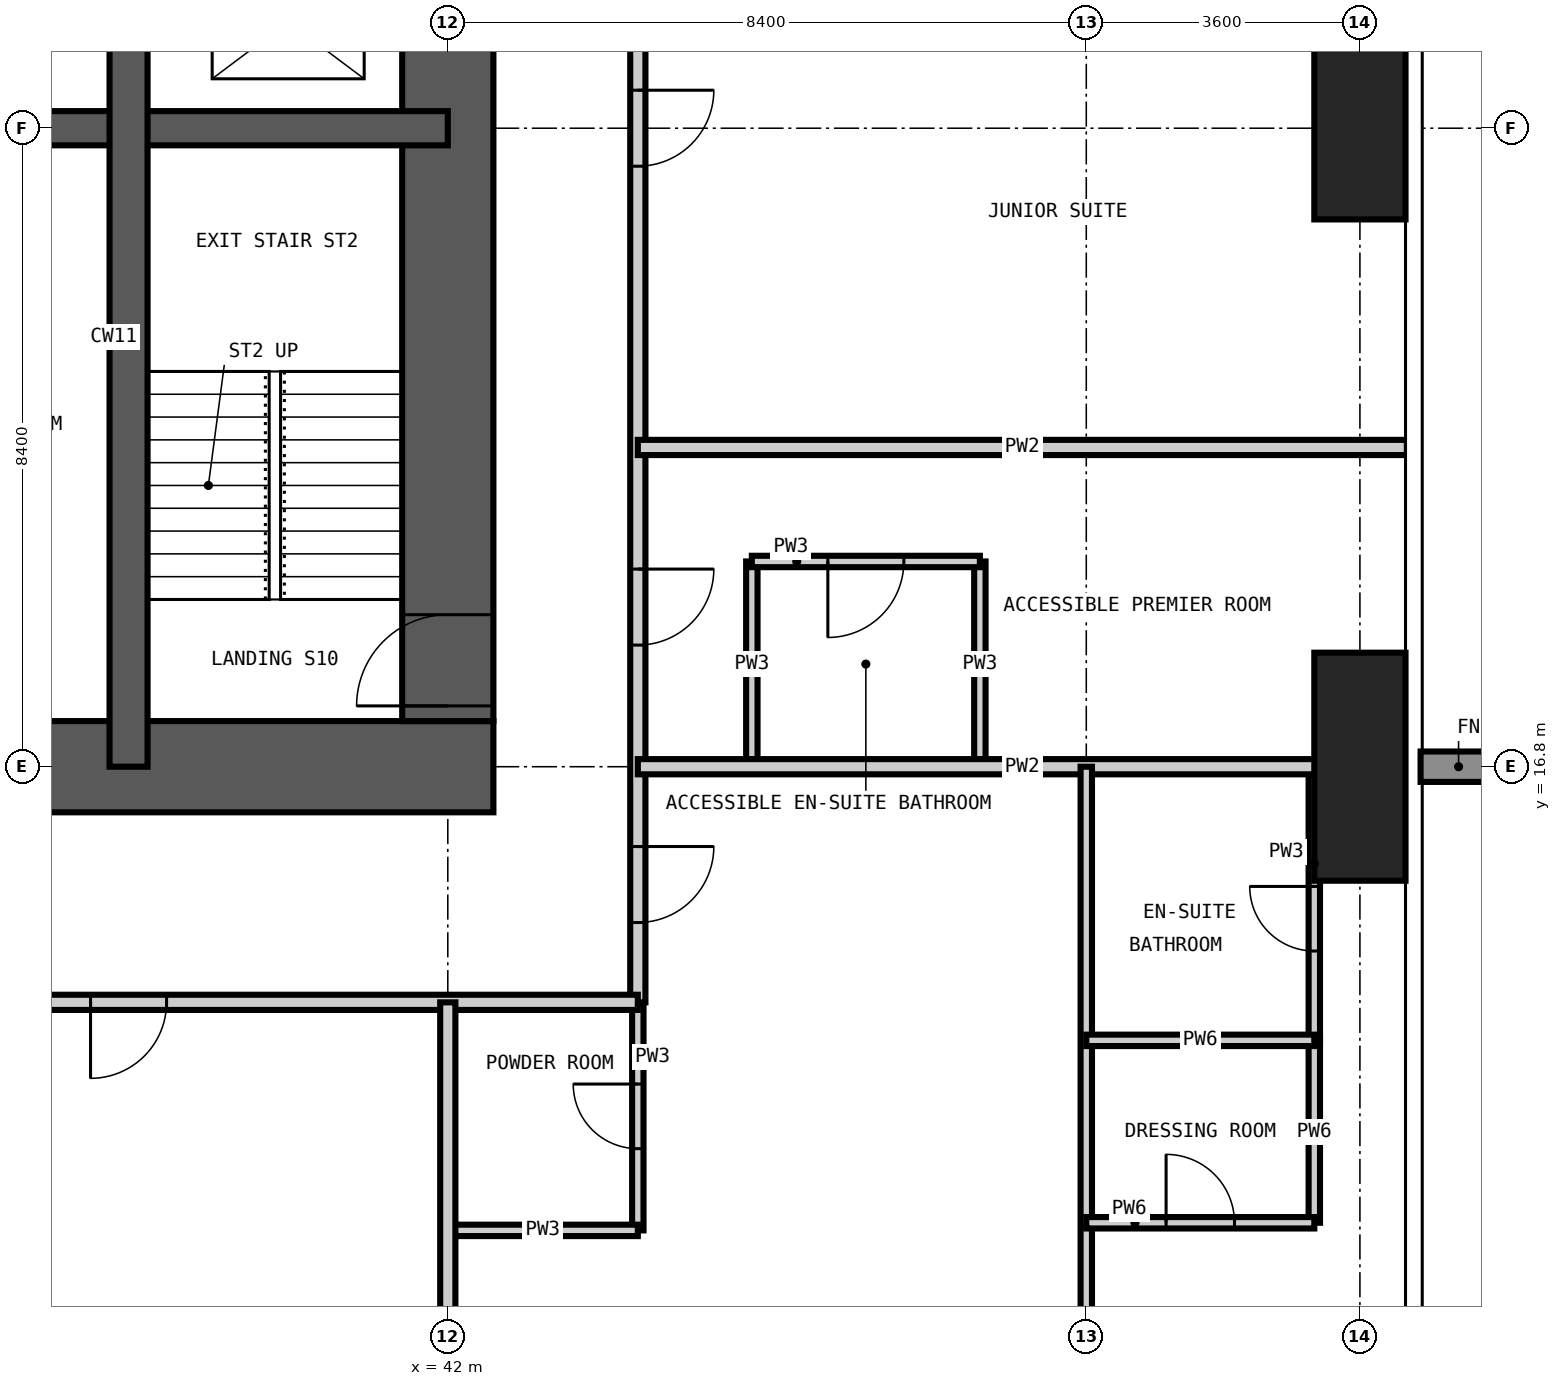
"""IFC4 building model, lengths in metres.
Left out: names, types, materials, properties, quantities, classifications, styles, units other than length and angle.
Written with IfcOpenShell. Run it as: python <this file> out.ifc"""

import sys

from ifc_helpers import new_model, si_unit, direction, frame, frame_2d, origin, origin_2d, place, context, subcontext, project, spatial, rectangle, extrude, element, fill, save


model = new_model("IFC4")
c1 = context("Model", 3, precision=1e-05, world=origin(), true_north=direction((0.0, 1.0)))
c2 = subcontext(c1, "Body", "Model", "MODEL_VIEW")
j1 = project(units=[si_unit("LENGTHUNIT", "METRE"), si_unit("PLANEANGLEUNIT", "RADIAN")], contexts=[c1])
p1 = place(None, origin())
s1 = spatial("IfcSite", under=j1, at=p1, CompositionType="ELEMENT")
p2 = place(p1, origin())
s2 = spatial("IfcBuilding", under=s1, at=p2, CompositionType="ELEMENT")
p3 = place(p2, frame((0.0, 0.0, 97.2)))
s3 = spatial("IfcBuildingStorey", under=s2, at=p3, CompositionType="ELEMENT", Elevation=97.2)
p4 = place(p3, frame((54.0, 16.8, -0.35), z_axis=(0.0, 0.0, 1.0), x_axis=(1.0, 0.0, 0.0)))
e1 = element("IfcColumn", 1, at=p4, inside=s3, PredefinedType="COLUMN", context=c2, shape_type="SweptSolid", body=[
    extrude(rectangle(XDim=1.2, YDim=3.0, at=origin_2d()), origin(), (0.0, 0.0, 1.0), 3.6),
])
p5 = place(p3, frame((54.0, 25.2, -0.35), z_axis=(0.0, 0.0, 1.0), x_axis=(1.0, 0.0, 0.0)))
e2 = element("IfcColumn", 2, at=p5, inside=s3, PredefinedType="COLUMN", context=c2, shape_type="SweptSolid", body=[
    extrude(rectangle(XDim=1.2, YDim=2.4, at=origin_2d()), origin(), (0.0, 0.0, 1.0), 3.6),
])
p6 = place(p3, frame((16.2, 16.8, -0.35), z_axis=(0.0, 0.0, 1.0), x_axis=(1.0, 0.0, 0.0)))
e3 = element("IfcWall", 3, at=p6, inside=s3, PredefinedType="SHEAR", context=c2, shape_type="SweptSolid", body=[
    extrude(rectangle(XDim=26.4, YDim=1.2, at=frame_2d((13.2, 0.0))), origin(), (0.0, 0.0, 1.0), 3.6),
])
p7 = place(p6, frame((12.7, 0.0, 0.35)))
e4 = element("IfcOpeningElement", 4, at=p7, cuts=e3, PredefinedType="OPENING", context=c2, shape_type="SweptSolid", body=[
    extrude(rectangle(XDim=1.0, YDim=2.1, at=frame_2d((0.5, 1.05))), frame((0.0, 0.61, 0.0), z_axis=(0.0, -1.0, 0.0), x_axis=(1.0, 0.0, 0.0)), (0.0, 0.0, 1.0), 1.22),
])
p8 = place(p6, frame((19.0, 0.0, 0.35)))
e5 = element("IfcOpeningElement", 5, at=p8, cuts=e3, PredefinedType="OPENING", context=c2, shape_type="SweptSolid", body=[
    extrude(rectangle(XDim=1.0, YDim=2.1, at=frame_2d((0.5, 1.05))), frame((0.0, 0.61, 0.0), z_axis=(0.0, -1.0, 0.0), x_axis=(1.0, 0.0, 0.0)), (0.0, 0.0, 1.0), 1.22),
])
p9 = place(p3, frame((42.0, 17.4, -0.35), z_axis=(0.0, 0.0, 1.0), x_axis=(0.0, 1.0, 0.0)))
e6 = element("IfcWall", 6, at=p9, inside=s3, PredefinedType="SHEAR", context=c2, shape_type="SweptSolid", body=[
    extrude(rectangle(XDim=24.0, YDim=1.2, at=frame_2d((12.0, 0.0))), origin(), (0.0, 0.0, 1.0), 3.6),
])
p10 = place(p9, frame((0.2, 0.0, 0.35)))
e7 = element("IfcOpeningElement", 7, at=p10, cuts=e6, PredefinedType="OPENING", context=c2, shape_type="SweptSolid", body=[
    extrude(rectangle(XDim=1.2, YDim=2.2, at=frame_2d((0.6, 1.1))), frame((0.0, 0.61, 0.0), z_axis=(0.0, -1.0, 0.0), x_axis=(1.0, 0.0, 0.0)), (0.0, 0.0, 1.0), 1.22),
])
p11 = place(p9, frame((11.1, 0.0, 0.35)))
e8 = element("IfcOpeningElement", 8, at=p11, cuts=e6, PredefinedType="OPENING", context=c2, shape_type="SweptSolid", body=[
    extrude(rectangle(XDim=1.8, YDim=2.2, at=frame_2d((0.9, 1.1))), frame((0.0, 0.61, 0.0), z_axis=(0.0, -1.0, 0.0), x_axis=(1.0, 0.0, 0.0)), (0.0, 0.0, 1.0), 1.22),
])
p12 = place(p9, frame((19.9, 0.0, 0.35)))
e9 = element("IfcOpeningElement", 9, at=p12, cuts=e6, PredefinedType="OPENING", context=c2, shape_type="SweptSolid", body=[
    extrude(rectangle(XDim=1.0, YDim=2.1, at=frame_2d((0.5, 1.05))), frame((0.0, 0.61, 0.0), z_axis=(0.0, -1.0, 0.0), x_axis=(1.0, 0.0, 0.0)), (0.0, 0.0, 1.0), 1.22),
])
p13 = place(p3, frame((16.8, 25.2, -0.35), z_axis=(0.0, 0.0, 1.0), x_axis=(1.0, 0.0, 0.0)))
e10 = element("IfcWall", 10, at=p13, inside=s3, PredefinedType="SHEAR", context=c2, shape_type="SweptSolid", body=[
    extrude(rectangle(XDim=25.2, YDim=0.45, at=frame_2d((12.6, 0.0))), origin(), (0.0, 0.0, 1.0), 3.6),
])
p14 = place(p3, frame((37.8, 16.8, -0.35), z_axis=(0.0, 0.0, 1.0), x_axis=(0.0, 1.0, 0.0)))
e11 = element("IfcWall", 11, at=p14, inside=s3, PredefinedType="SHEAR", context=c2, shape_type="SweptSolid", body=[
    extrude(rectangle(XDim=11.2, YDim=0.5, at=frame_2d((5.6, 0.0))), origin(), (0.0, 0.0, 1.0), 3.6),
])
p15 = place(p3, frame((44.5, 10.7, 0.0), z_axis=(0.0, 0.0, 1.0), x_axis=(0.0, 1.0, 0.0)))
e12 = element("IfcWall", 12, at=p15, inside=s3, PredefinedType="PARTITIONING", context=c2, shape_type="SweptSolid", body=[
    extrude(rectangle(XDim=3.0, YDim=0.15, at=frame_2d((1.5, 0.0))), origin(), (0.0, 0.0, 1.0), 3.25),
])
p16 = place(p15, frame((1.075, 0.0, 0.0)))
e13 = element("IfcOpeningElement", 13, at=p16, cuts=e12, PredefinedType="OPENING", context=c2, shape_type="SweptSolid", body=[
    extrude(rectangle(XDim=0.85, YDim=2.1, at=frame_2d((0.425, 1.05))), frame((0.0, 0.085, 0.0), z_axis=(0.0, -1.0, 0.0), x_axis=(1.0, 0.0, 0.0)), (0.0, 0.0, 1.0), 0.17),
])
for number, where, z_axis, x_axis in (
    (14, (46.0, 16.8, 0.0), (0.0, 0.0, 1.0), (0.0, 1.0, 0.0)),
    (15, (49.0, 16.8, 0.0), (0.0, 0.0, 1.0), (0.0, 1.0, 0.0)),
):
    element("IfcWall", number, at=place(p3, frame(where, z_axis=z_axis, x_axis=x_axis)), inside=s3, PredefinedType="PARTITIONING", context=c2, shape_type="SweptSolid", body=[
        extrude(rectangle(XDim=2.7, YDim=0.15, at=frame_2d((1.35, 0.0))), origin(), (0.0, 0.0, 1.0), 3.25),
    ])
p17 = place(p3, frame((53.4, 13.2, 0.0), z_axis=(0.0, 0.0, 1.0), x_axis=(0.0, 1.0, 0.0)))
e16 = element("IfcWall", 16, at=p17, inside=s3, PredefinedType="PARTITIONING", context=c2, shape_type="SweptSolid", body=[
    extrude(rectangle(XDim=3.6, YDim=0.15, at=frame_2d((1.8, 0.0))), origin(), (0.0, 0.0, 1.0), 3.25),
])
p18 = place(p17, frame((1.175, 0.0, 0.0)))
e17 = element("IfcOpeningElement", 17, at=p18, cuts=e16, PredefinedType="OPENING", context=c2, shape_type="SweptSolid", body=[
    extrude(rectangle(XDim=0.85, YDim=2.1, at=frame_2d((0.425, 1.05))), frame((0.0, 0.085, 0.0), z_axis=(0.0, -1.0, 0.0), x_axis=(1.0, 0.0, 0.0)), (0.0, 0.0, 1.0), 0.17),
])
p19 = place(p3, frame((42.0, 10.7, 0.0), z_axis=(0.0, 0.0, 1.0), x_axis=(1.0, 0.0, 0.0)))
e18 = element("IfcWall", 18, at=p19, inside=s3, PredefinedType="PARTITIONING", context=c2, shape_type="SweptSolid", body=[
    extrude(rectangle(XDim=2.5, YDim=0.15, at=frame_2d((1.25, 0.0))), origin(), (0.0, 0.0, 1.0), 3.25),
])
p20 = place(p3, frame((46.0, 19.5, 0.0), z_axis=(0.0, 0.0, 1.0), x_axis=(1.0, 0.0, 0.0)))
e19 = element("IfcWall", 19, at=p20, inside=s3, PredefinedType="PARTITIONING", context=c2, shape_type="SweptSolid", body=[
    extrude(rectangle(XDim=3.0, YDim=0.15, at=frame_2d((1.5, 0.0))), origin(), (0.0, 0.0, 1.0), 3.25),
])
p21 = place(p20, frame((1.0, 0.0, 0.0)))
e20 = element("IfcOpeningElement", 20, at=p21, cuts=e19, PredefinedType="OPENING", context=c2, shape_type="SweptSolid", body=[
    extrude(rectangle(XDim=1.0, YDim=2.1, at=frame_2d((0.5, 1.05))), frame((0.0, 0.085, 0.0), z_axis=(0.0, -1.0, 0.0), x_axis=(1.0, 0.0, 0.0)), (0.0, 0.0, 1.0), 0.17),
])
p22 = place(p3, frame((44.5, 45.7, 0.0), z_axis=(0.0, 0.0, 1.0), x_axis=(0.0, -1.0, 0.0)))
e21 = element("IfcWall", 21, at=p22, inside=s3, PredefinedType="PARTITIONING", context=c2, shape_type="SweptSolid", body=[
    extrude(rectangle(XDim=32.0, YDim=0.2, at=frame_2d((16.0, 0.0))), origin(), (0.0, 0.0, 1.0), 3.25),
])
p23 = place(p22, frame((26.3, 0.0, 0.0)))
e22 = element("IfcOpeningElement", 22, at=p23, cuts=e21, PredefinedType="OPENING", context=c2, shape_type="SweptSolid", body=[
    extrude(rectangle(XDim=1.0, YDim=2.2, at=frame_2d((0.5, 1.1))), frame((0.0, 0.11, 0.0), z_axis=(0.0, -1.0, 0.0), x_axis=(1.0, 0.0, 0.0)), (0.0, 0.0, 1.0), 0.22),
])
p24 = place(p22, frame((20.0, 0.0, 0.0)))
e23 = element("IfcOpeningElement", 23, at=p24, cuts=e21, PredefinedType="OPENING", context=c2, shape_type="SweptSolid", body=[
    extrude(rectangle(XDim=1.0, YDim=2.2, at=frame_2d((0.5, 1.1))), frame((0.0, 0.11, 0.0), z_axis=(0.0, -1.0, 0.0), x_axis=(1.0, 0.0, 0.0)), (0.0, 0.0, 1.0), 0.22),
])
p25 = place(p22, frame((11.6, 0.0, 0.0)))
e24 = element("IfcOpeningElement", 24, at=p25, cuts=e21, PredefinedType="OPENING", context=c2, shape_type="SweptSolid", body=[
    extrude(rectangle(XDim=1.0, YDim=2.2, at=frame_2d((0.5, 1.1))), frame((0.0, 0.11, 0.0), z_axis=(0.0, -1.0, 0.0), x_axis=(1.0, 0.0, 0.0)), (0.0, 0.0, 1.0), 0.22),
])
p26 = place(p22, frame((5.3, 0.0, 0.0)))
e25 = element("IfcOpeningElement", 25, at=p26, cuts=e21, PredefinedType="OPENING", context=c2, shape_type="SweptSolid", body=[
    extrude(rectangle(XDim=1.0, YDim=2.2, at=frame_2d((0.5, 1.1))), frame((0.0, 0.11, 0.0), z_axis=(0.0, -1.0, 0.0), x_axis=(1.0, 0.0, 0.0)), (0.0, 0.0, 1.0), 0.22),
])
p27 = place(p22, frame((29.95, 0.0, 0.0)))
e26 = element("IfcOpeningElement", 26, at=p27, cuts=e21, PredefinedType="OPENING", context=c2, shape_type="SweptSolid", body=[
    extrude(rectangle(XDim=1.0, YDim=2.2, at=frame_2d((0.5, 1.1))), frame((0.0, 0.11, 0.0), z_axis=(0.0, -1.0, 0.0), x_axis=(1.0, 0.0, 0.0)), (0.0, 0.0, 1.0), 0.22),
])
p28 = place(p22, frame((1.35, 0.0, 0.0)))
e27 = element("IfcOpeningElement", 27, at=p28, cuts=e21, PredefinedType="OPENING", context=c2, shape_type="SweptSolid", body=[
    extrude(rectangle(XDim=1.0, YDim=2.2, at=frame_2d((0.5, 1.1))), frame((0.0, 0.11, 0.0), z_axis=(0.0, -1.0, 0.0), x_axis=(1.0, 0.0, 0.0)), (0.0, 0.0, 1.0), 0.22),
])
p29 = place(p3, frame((44.5, 13.7, 0.0), z_axis=(0.0, 0.0, 1.0), x_axis=(-1.0, 0.0, 0.0)))
e28 = element("IfcWall", 28, at=p29, inside=s3, PredefinedType="PARTITIONING", context=c2, shape_type="SweptSolid", body=[
    extrude(rectangle(XDim=31.9, YDim=0.2, at=frame_2d((15.95, 0.0))), origin(), (0.0, 0.0, 1.0), 3.25),
])
p30 = place(p29, frame((23.0, 0.0, 0.0)))
e29 = element("IfcOpeningElement", 29, at=p30, cuts=e28, PredefinedType="OPENING", context=c2, shape_type="SweptSolid", body=[
    extrude(rectangle(XDim=1.0, YDim=2.2, at=frame_2d((0.5, 1.1))), frame((0.0, 0.11, 0.0), z_axis=(0.0, -1.0, 0.0), x_axis=(1.0, 0.0, 0.0)), (0.0, 0.0, 1.0), 0.22),
])
p31 = place(p29, frame((14.6, 0.0, 0.0)))
e30 = element("IfcOpeningElement", 30, at=p31, cuts=e28, PredefinedType="OPENING", context=c2, shape_type="SweptSolid", body=[
    extrude(rectangle(XDim=1.0, YDim=2.2, at=frame_2d((0.5, 1.1))), frame((0.0, 0.11, 0.0), z_axis=(0.0, -1.0, 0.0), x_axis=(1.0, 0.0, 0.0)), (0.0, 0.0, 1.0), 0.22),
])
p32 = place(p29, frame((6.2, 0.0, 0.0)))
e31 = element("IfcOpeningElement", 31, at=p32, cuts=e28, PredefinedType="OPENING", context=c2, shape_type="SweptSolid", body=[
    extrude(rectangle(XDim=1.0, YDim=2.2, at=frame_2d((0.5, 1.1))), frame((0.0, 0.11, 0.0), z_axis=(0.0, -1.0, 0.0), x_axis=(1.0, 0.0, 0.0)), (0.0, 0.0, 1.0), 0.22),
])
p33 = place(p3, frame((42.0, -0.018, 0.0), z_axis=(0.0, 0.0, 1.0), x_axis=(0.0, 1.0, 0.0)))
e32 = element("IfcWall", 32, at=p33, inside=s3, PredefinedType="PARTITIONING", context=c2, shape_type="SweptSolid", body=[
    extrude(rectangle(XDim=13.718, YDim=0.2, at=frame_2d((6.859, 0.0))), origin(), (0.0, 0.0, 1.0), 3.25),
])
for number, where, z_axis, x_axis in (
    (33, (44.5, 16.8, 0.0), (0.0, 0.0, 1.0), (1.0, 0.0, 0.0)),
    (34, (44.5, 21.0, 0.0), (0.0, 0.0, 1.0), (1.0, 0.0, 0.0)),
):
    element("IfcWall", number, at=place(p3, frame(where, z_axis=z_axis, x_axis=x_axis)), inside=s3, PredefinedType="PARTITIONING", context=c2, shape_type="SweptSolid", body=[
        extrude(rectangle(XDim=10.118, YDim=0.2, at=frame_2d((5.059, 0.0))), origin(), (0.0, 0.0, 1.0), 3.25),
    ])
p34 = place(p3, frame((50.4, -0.018, 0.0), z_axis=(0.0, 0.0, 1.0), x_axis=(0.0, 1.0, 0.0)))
e35 = element("IfcWall", 35, at=p34, inside=s3, PredefinedType="PARTITIONING", context=c2, shape_type="SweptSolid", body=[
    extrude(rectangle(XDim=16.818, YDim=0.15, at=frame_2d((8.409, 0.0))), origin(), (0.0, 0.0, 1.0), 3.25),
])
p35 = place(p34, frame((5.968, 0.0, 0.0)))
e36 = element("IfcOpeningElement", 36, at=p35, cuts=e35, PredefinedType="OPENING", context=c2, shape_type="SweptSolid", body=[
    extrude(rectangle(XDim=0.9, YDim=2.1, at=frame_2d((0.45, 1.05))), frame((0.0, 0.085, 0.0), z_axis=(0.0, -1.0, 0.0), x_axis=(1.0, 0.0, 0.0)), (0.0, 0.0, 1.0), 0.17),
])
p36 = place(p3, frame((53.4, 10.8, 0.0), z_axis=(0.0, 0.0, 1.0), x_axis=(0.0, 1.0, 0.0)))
e37 = element("IfcWall", 37, at=p36, inside=s3, PredefinedType="PARTITIONING", context=c2, shape_type="SweptSolid", body=[
    extrude(rectangle(XDim=2.4, YDim=0.15, at=frame_2d((1.2, 0.0))), origin(), (0.0, 0.0, 1.0), 3.25),
])
p37 = place(p3, frame((50.4, 10.8, 0.0), z_axis=(0.0, 0.0, 1.0), x_axis=(1.0, 0.0, 0.0)))
e38 = element("IfcWall", 38, at=p37, inside=s3, PredefinedType="PARTITIONING", context=c2, shape_type="SweptSolid", body=[
    extrude(rectangle(XDim=3.0, YDim=0.15, at=frame_2d((1.5, 0.0))), origin(), (0.0, 0.0, 1.0), 3.25),
])
p38 = place(p37, frame((1.05, 0.0, 0.0)))
e39 = element("IfcOpeningElement", 39, at=p38, cuts=e38, PredefinedType="OPENING", context=c2, shape_type="SweptSolid", body=[
    extrude(rectangle(XDim=0.9, YDim=2.1, at=frame_2d((0.45, 1.05))), frame((0.0, 0.085, 0.0), z_axis=(0.0, -1.0, 0.0), x_axis=(1.0, 0.0, 0.0)), (0.0, 0.0, 1.0), 0.17),
])
p39 = place(p3, frame((50.4, 13.2, 0.0), z_axis=(0.0, 0.0, 1.0), x_axis=(1.0, 0.0, 0.0)))
e40 = element("IfcWall", 40, at=p39, inside=s3, PredefinedType="PARTITIONING", context=c2, shape_type="SweptSolid", body=[
    extrude(rectangle(XDim=3.0, YDim=0.15, at=frame_2d((1.5, 0.0))), origin(), (0.0, 0.0, 1.0), 3.25),
])
p40 = place(p10, origin())
e41 = element("IfcDoor", 41, at=p40, inside=s3, OperationType="SINGLE_SWING_LEFT", PredefinedType="DOOR", context=c2, shape_type="SweptSolid", body=[
    extrude(rectangle(XDim=1.2, YDim=2.2, at=frame_2d((0.6, 1.1))), frame((0.0, 0.025, 0.0), z_axis=(0.0, -1.0, 0.0), x_axis=(1.0, 0.0, 0.0)), (0.0, 0.0, 1.0), 0.05),
])
fill(e7, e41)
p41 = place(p32, origin())
e42 = element("IfcDoor", 42, at=p41, inside=s3, OperationType="SINGLE_SWING_RIGHT", PredefinedType="DOOR", context=c2, shape_type="SweptSolid", body=[
    extrude(rectangle(XDim=1.0, YDim=2.2, at=frame_2d((0.5, 1.1))), frame((0.0, 0.025, 0.0), z_axis=(0.0, -1.0, 0.0), x_axis=(1.0, 0.0, 0.0)), (0.0, 0.0, 1.0), 0.05),
])
fill(e31, e42)
p42 = place(p23, origin())
e43 = element("IfcDoor", 43, at=p42, inside=s3, OperationType="SINGLE_SWING_LEFT", PredefinedType="DOOR", context=c2, shape_type="SweptSolid", body=[
    extrude(rectangle(XDim=1.0, YDim=2.2, at=frame_2d((0.5, 1.1))), frame((0.0, 0.025, 0.0), z_axis=(0.0, -1.0, 0.0), x_axis=(1.0, 0.0, 0.0)), (0.0, 0.0, 1.0), 0.05),
])
fill(e22, e43)
p43 = place(p21, frame((1.0, 0.0, 0.0), z_axis=(0.0, 0.0, 1.0), x_axis=(-1.0, 0.0, 0.0)))
e44 = element("IfcDoor", 44, at=p43, inside=s3, OperationType="SINGLE_SWING_RIGHT", PredefinedType="DOOR", context=c2, shape_type="SweptSolid", body=[
    extrude(rectangle(XDim=1.0, YDim=2.1, at=frame_2d((0.5, 1.05))), frame((0.0, 0.025, 0.0), z_axis=(0.0, -1.0, 0.0), x_axis=(1.0, 0.0, 0.0)), (0.0, 0.0, 1.0), 0.05),
])
fill(e20, e44)
p44 = place(p24, origin())
e45 = element("IfcDoor", 45, at=p44, inside=s3, OperationType="SINGLE_SWING_LEFT", PredefinedType="DOOR", context=c2, shape_type="SweptSolid", body=[
    extrude(rectangle(XDim=1.0, YDim=2.2, at=frame_2d((0.5, 1.1))), frame((0.0, 0.025, 0.0), z_axis=(0.0, -1.0, 0.0), x_axis=(1.0, 0.0, 0.0)), (0.0, 0.0, 1.0), 0.05),
])
fill(e23, e45)
p45 = place(p27, origin())
e46 = element("IfcDoor", 46, at=p45, inside=s3, OperationType="SINGLE_SWING_LEFT", PredefinedType="DOOR", context=c2, shape_type="SweptSolid", body=[
    extrude(rectangle(XDim=1.0, YDim=2.2, at=frame_2d((0.5, 1.1))), frame((0.0, 0.025, 0.0), z_axis=(0.0, -1.0, 0.0), x_axis=(1.0, 0.0, 0.0)), (0.0, 0.0, 1.0), 0.05),
])
fill(e26, e46)
p46 = place(p16, origin())
e47 = element("IfcDoor", 47, at=p46, inside=s3, OperationType="SINGLE_SWING_RIGHT", PredefinedType="DOOR", context=c2, shape_type="SweptSolid", body=[
    extrude(rectangle(XDim=0.85, YDim=2.1, at=frame_2d((0.425, 1.05))), frame((0.0, 0.025, 0.0), z_axis=(0.0, -1.0, 0.0), x_axis=(1.0, 0.0, 0.0)), (0.0, 0.0, 1.0), 0.05),
])
fill(e13, e47)
p47 = place(p18, origin())
e48 = element("IfcDoor", 48, at=p47, inside=s3, OperationType="SINGLE_SWING_RIGHT", PredefinedType="DOOR", context=c2, shape_type="SweptSolid", body=[
    extrude(rectangle(XDim=0.85, YDim=2.1, at=frame_2d((0.425, 1.05))), frame((0.0, 0.025, 0.0), z_axis=(0.0, -1.0, 0.0), x_axis=(1.0, 0.0, 0.0)), (0.0, 0.0, 1.0), 0.05),
])
fill(e17, e48)
p48 = place(p38, origin())
e49 = element("IfcDoor", 49, at=p48, inside=s3, OperationType="SINGLE_SWING_LEFT", PredefinedType="DOOR", context=c2, shape_type="SweptSolid", body=[
    extrude(rectangle(XDim=0.9, YDim=2.1, at=frame_2d((0.45, 1.05))), frame((0.0, 0.025, 0.0), z_axis=(0.0, -1.0, 0.0), x_axis=(1.0, 0.0, 0.0)), (0.0, 0.0, 1.0), 0.05),
])
fill(e39, e49)
save(model, sys.argv[1])
